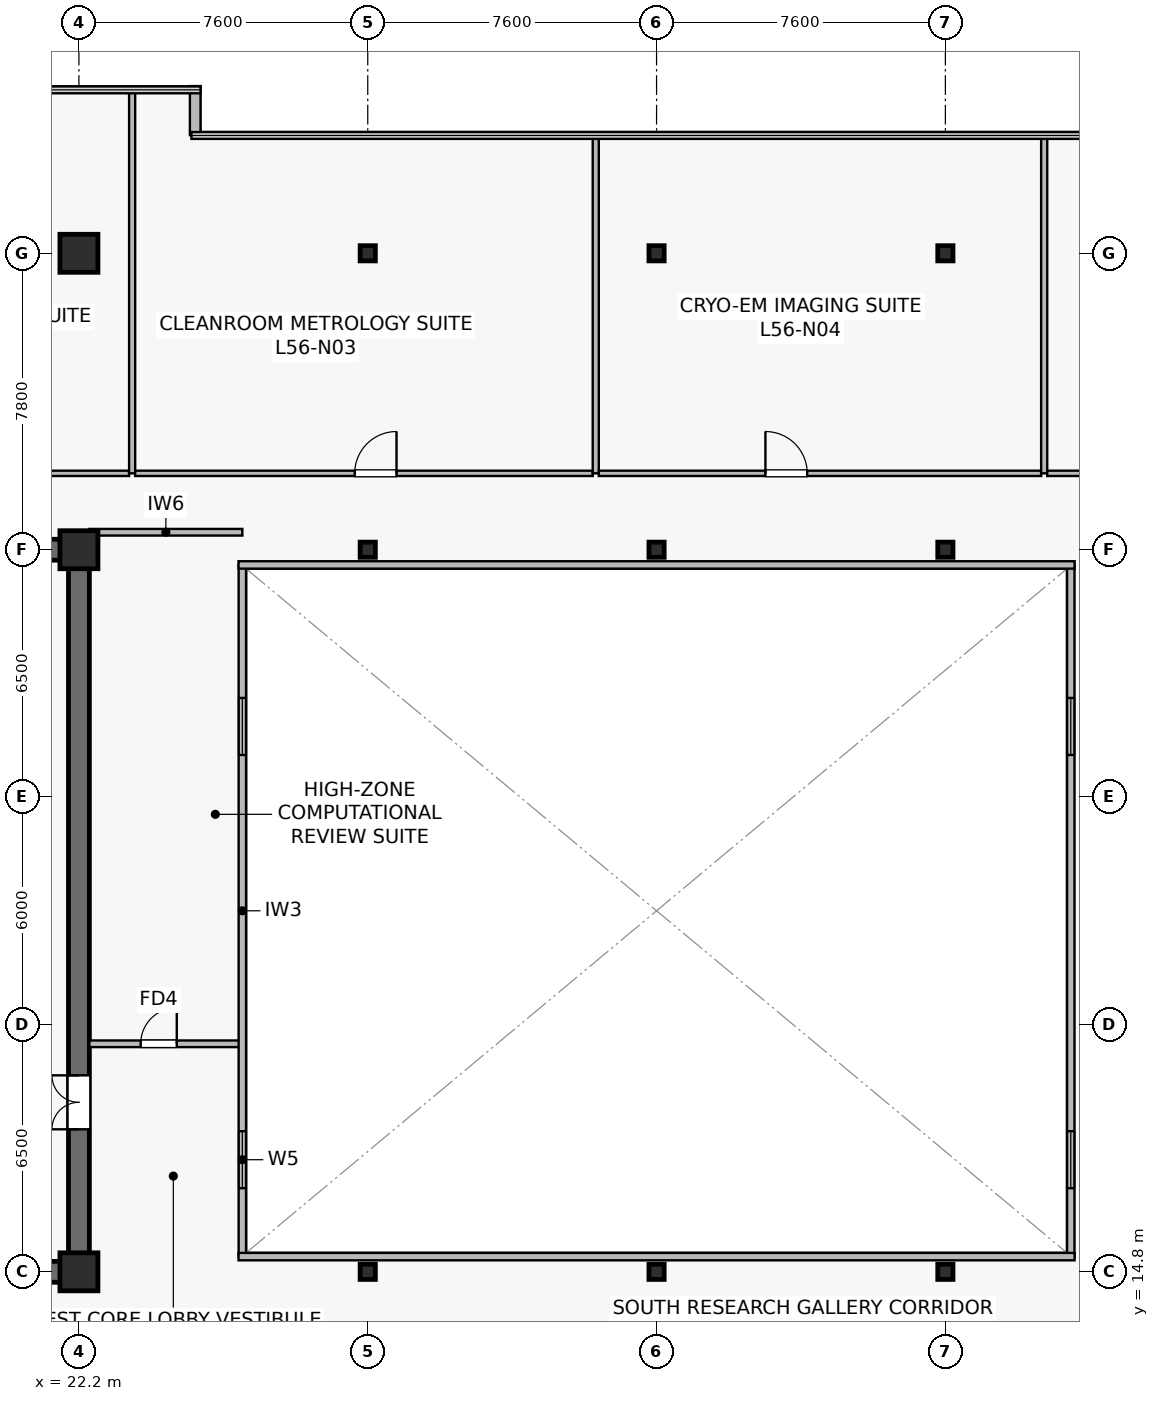
"""IFC4 building model, lengths in metres.
Left out: names, types, materials, properties, quantities, classifications, styles, units other than length and angle.
Written with IfcOpenShell. Run it as: python <this file> out.ifc"""

import sys

from ifc_helpers import new_model, si_unit, direction, frame, frame_2d, origin, origin_2d, place, context, subcontext, project, spatial, rectangle, hollow_rectangle, extrude, source, transform, mapped, element, fill, save


model = new_model("IFC4")
c1 = context("Model", 3, precision=1e-05, world=origin(), true_north=direction((0.0, 1.0)))
c2 = subcontext(c1, "Body", "Model", "MODEL_VIEW")
j1 = project(units=[si_unit("LENGTHUNIT", "METRE"), si_unit("PLANEANGLEUNIT", "RADIAN")], contexts=[c1])
p1 = place(None, origin())
s1 = spatial("IfcSite", under=j1, at=p1, CompositionType="ELEMENT")
p2 = place(p1, origin())
s2 = spatial("IfcBuilding", under=s1, at=p2, CompositionType="ELEMENT")
p3 = place(p2, frame((0.0, 0.0, 234.2)))
s3 = spatial("IfcBuildingStorey", under=s2, at=p3, CompositionType="ELEMENT", Elevation=234.2)
p4 = place(p3, frame((7.125, 14.8, 0.0), z_axis=(0.0, 0.0, 1.0), x_axis=(1.0, 0.0, 0.0)))
e1 = element("IfcWall", 1, at=p4, inside=s3, PredefinedType="SHEAR", context=c2, shape_type="SweptSolid", body=[
    extrude(rectangle(XDim=15.35, YDim=0.55, at=frame_2d((7.675, 0.0))), origin(), (0.0, 0.0, 1.0), 3.8),
])
p5 = place(p3, frame((7.125, 33.8, 0.0), z_axis=(0.0, 0.0, 1.0), x_axis=(1.0, 0.0, 0.0)))
e2 = element("IfcWall", 2, at=p5, inside=s3, PredefinedType="SHEAR", context=c2, shape_type="SweptSolid", body=[
    extrude(rectangle(XDim=15.35, YDim=0.55, at=frame_2d((7.675, 0.0))), origin(), (0.0, 0.0, 1.0), 3.8),
])
p6 = place(p5, frame((6.775, 0.0, 0.0)))
e3 = element("IfcOpeningElement", 3, at=p6, cuts=e2, PredefinedType="OPENING", context=c2, shape_type="SweptSolid", body=[
    extrude(rectangle(XDim=0.95, YDim=2.15, at=frame_2d((0.475, 1.075))), frame((0.0, 0.285, 0.0), z_axis=(0.0, -1.0, 0.0), x_axis=(1.0, 0.0, 0.0)), (0.0, 0.0, 1.0), 0.57),
])
p7 = place(p5, frame((11.84, 0.0, 0.0)))
e4 = element("IfcOpeningElement", 4, at=p7, cuts=e2, PredefinedType="OPENING", context=c2, shape_type="SweptSolid", body=[
    extrude(rectangle(XDim=0.95, YDim=2.15, at=frame_2d((0.475, 1.075))), frame((0.0, 0.285, 0.0), z_axis=(0.0, -1.0, 0.0), x_axis=(1.0, 0.0, 0.0)), (0.0, 0.0, 1.0), 0.57),
])
p8 = place(p3, frame((22.2, 15.075, 0.0), z_axis=(0.0, 0.0, 1.0), x_axis=(0.0, 1.0, 0.0)))
e5 = element("IfcWall", 5, at=p8, inside=s3, PredefinedType="SHEAR", context=c2, shape_type="SweptSolid", body=[
    extrude(rectangle(XDim=18.45, YDim=0.55, at=frame_2d((9.225, 0.0))), origin(), (0.0, 0.0, 1.0), 3.8),
])
p9 = place(p8, frame((3.475, 0.0, 0.0)))
e6 = element("IfcOpeningElement", 6, at=p9, cuts=e5, PredefinedType="OPENING", context=c2, shape_type="SweptSolid", body=[
    extrude(rectangle(XDim=1.42, YDim=2.2, at=frame_2d((0.71, 1.1))), frame((0.0, 0.285, 0.0), z_axis=(0.0, -1.0, 0.0), x_axis=(1.0, 0.0, 0.0)), (0.0, 0.0, 1.0), 0.57),
])
m1 = source(origin(), c2, "Body", "SweptSolid", [
    extrude(rectangle(XDim=1.0, YDim=1.0, at=origin_2d()), origin(), (0.0, 0.0, 1.0), 4.1),
])
for number, where, z_axis, x_axis in (
    (7, (22.2, 14.8, 0.0), (0.0, 0.0, 1.0), (1.0, 0.0, 0.0)),
    (8, (22.2, 33.8, 0.0), (0.0, 0.0, 1.0), (1.0, 0.0, 0.0)),
    (9, (22.2, 41.6, 0.0), (0.0, 0.0, 1.0), (1.0, 0.0, 0.0)),
):
    element("IfcColumn", number, at=place(p3, frame(where, z_axis=z_axis, x_axis=x_axis)), inside=s3, PredefinedType="COLUMN", context=c2, shape_type="MappedRepresentation", body=[
        mapped(m1, transform((0.0, 0.0, 0.0), scale=1.0)),
    ])
m2 = source(origin(), c2, "Body", "SweptSolid", [
    extrude(hollow_rectangle(XDim=0.4, YDim=0.4, WallThickness=0.019, at=origin_2d()), origin(), (0.0, 0.0, 1.0), 4.1),
])
for number, where, z_axis, x_axis in (
    (10, (29.8, 14.8, 0.0), (0.0, 0.0, 1.0), (1.0, 0.0, 0.0)),
    (11, (29.8, 33.8, 0.0), (0.0, 0.0, 1.0), (1.0, 0.0, 0.0)),
    (12, (29.8, 41.6, 0.0), (0.0, 0.0, 1.0), (1.0, 0.0, 0.0)),
    (13, (37.4, 14.8, 0.0), (0.0, 0.0, 1.0), (1.0, 0.0, 0.0)),
    (14, (37.4, 33.8, 0.0), (0.0, 0.0, 1.0), (1.0, 0.0, 0.0)),
    (15, (37.4, 41.6, 0.0), (0.0, 0.0, 1.0), (1.0, 0.0, 0.0)),
    (16, (45.0, 14.8, 0.0), (0.0, 0.0, 1.0), (1.0, 0.0, 0.0)),
    (17, (45.0, 33.8, 0.0), (0.0, 0.0, 1.0), (1.0, 0.0, 0.0)),
    (18, (45.0, 41.6, 0.0), (0.0, 0.0, 1.0), (1.0, 0.0, 0.0)),
):
    element("IfcColumn", number, at=place(p3, frame(where, z_axis=z_axis, x_axis=x_axis)), inside=s3, PredefinedType="COLUMN", context=c2, shape_type="MappedRepresentation", body=[
        mapped(m2, transform((0.0, 0.0, 0.0), scale=1.0)),
    ])
p10 = place(p3, frame((25.26, 44.707, 0.0), z_axis=(0.0, 0.0, 1.0), x_axis=(0.0, 1.0, 0.0)))
e19 = element("IfcWall", 19, at=p10, inside=s3, PredefinedType="STANDARD", context=c2, shape_type="SweptSolid", body=[
    extrude(rectangle(XDim=1.293, YDim=0.28, at=frame_2d((0.646, 0.0))), origin(), (0.0, 0.0, 1.0), 3.8),
])
p11 = place(p3, frame((22.475, 34.26, 0.0), z_axis=(0.0, 0.0, 1.0), x_axis=(1.0, 0.0, 0.0)))
e20 = element("IfcWall", 20, at=p11, inside=s3, PredefinedType="PARTITIONING", context=c2, shape_type="SweptSolid", body=[
    extrude(rectangle(XDim=4.025, YDim=0.175, at=frame_2d((2.012, 0.0))), origin(), (0.0, 0.0, 1.0), 3.485),
])
p12 = place(p3, frame((22.475, 20.8, 0.0), z_axis=(0.0, 0.0, 1.0), x_axis=(1.0, 0.0, 0.0)))
e21 = element("IfcWall", 21, at=p12, inside=s3, PredefinedType="PARTITIONING", context=c2, shape_type="SweptSolid", body=[
    extrude(rectangle(XDim=4.025, YDim=0.175, at=frame_2d((2.012, 0.0))), origin(), (0.0, 0.0, 1.0), 3.8),
])
p13 = place(p12, frame((1.35, 0.0, 0.0)))
e22 = element("IfcOpeningElement", 22, at=p13, cuts=e21, PredefinedType="OPENING", context=c2, shape_type="SweptSolid", body=[
    extrude(rectangle(XDim=0.95, YDim=2.15, at=frame_2d((0.475, 1.075))), frame((0.0, 0.098, 0.0), z_axis=(0.0, -1.0, 0.0), x_axis=(1.0, 0.0, 0.0)), (0.0, 0.0, 1.0), 0.195),
])
p14 = place(p3, frame((26.5, 15.2, 0.0), z_axis=(0.0, 0.0, 1.0), x_axis=(0.0, 1.0, 0.0)))
e23 = element("IfcWall", 23, at=p14, inside=s3, PredefinedType="SOLIDWALL", context=c2, shape_type="SweptSolid", body=[
    extrude(rectangle(XDim=18.2, YDim=0.195, at=frame_2d((9.1, 0.0))), origin(), (0.0, 0.0, 1.0), 3.8),
])
p15 = place(p14, frame((1.8, 0.0, 0.9)))
e24 = element("IfcOpeningElement", 24, at=p15, cuts=e23, PredefinedType="OPENING", context=c2, shape_type="SweptSolid", body=[
    extrude(rectangle(XDim=1.5, YDim=1.4, at=frame_2d((0.75, 0.7))), frame((0.0, 0.107, 0.0), z_axis=(0.0, -1.0, 0.0), x_axis=(1.0, 0.0, 0.0)), (0.0, 0.0, 1.0), 0.215),
])
p16 = place(p14, frame((13.2, 0.0, 0.9)))
e25 = element("IfcOpeningElement", 25, at=p16, cuts=e23, PredefinedType="OPENING", context=c2, shape_type="SweptSolid", body=[
    extrude(rectangle(XDim=1.5, YDim=1.4, at=frame_2d((0.75, 0.7))), frame((0.0, 0.107, 0.0), z_axis=(0.0, -1.0, 0.0), x_axis=(1.0, 0.0, 0.0)), (0.0, 0.0, 1.0), 0.215),
])
p17 = place(p3, frame((48.3, 15.2, 0.0), z_axis=(0.0, 0.0, 1.0), x_axis=(0.0, 1.0, 0.0)))
e26 = element("IfcWall", 26, at=p17, inside=s3, PredefinedType="SOLIDWALL", context=c2, shape_type="SweptSolid", body=[
    extrude(rectangle(XDim=18.2, YDim=0.195, at=frame_2d((9.1, 0.0))), origin(), (0.0, 0.0, 1.0), 3.8),
])
p18 = place(p17, frame((1.8, 0.0, 0.9)))
e27 = element("IfcOpeningElement", 27, at=p18, cuts=e26, PredefinedType="OPENING", context=c2, shape_type="SweptSolid", body=[
    extrude(rectangle(XDim=1.5, YDim=1.4, at=frame_2d((0.75, 0.7))), frame((0.0, 0.107, 0.0), z_axis=(0.0, -1.0, 0.0), x_axis=(1.0, 0.0, 0.0)), (0.0, 0.0, 1.0), 0.215),
])
p19 = place(p17, frame((13.2, 0.0, 0.9)))
e28 = element("IfcOpeningElement", 28, at=p19, cuts=e26, PredefinedType="OPENING", context=c2, shape_type="SweptSolid", body=[
    extrude(rectangle(XDim=1.5, YDim=1.4, at=frame_2d((0.75, 0.7))), frame((0.0, 0.107, 0.0), z_axis=(0.0, -1.0, 0.0), x_axis=(1.0, 0.0, 0.0)), (0.0, 0.0, 1.0), 0.215),
])
for number, where, z_axis, x_axis in (
    (29, (26.4, 15.2, 0.0), (0.0, 0.0, 1.0), (1.0, 0.0, 0.0)),
    (30, (26.4, 33.4, 0.0), (0.0, 0.0, 1.0), (1.0, 0.0, 0.0)),
):
    element("IfcWall", number, at=place(p3, frame(where, z_axis=z_axis, x_axis=x_axis)), inside=s3, PredefinedType="SOLIDWALL", context=c2, shape_type="SweptSolid", body=[
        extrude(rectangle(XDim=22.0, YDim=0.195, at=frame_2d((11.0, 0.0))), origin(), (0.0, 0.0, 1.0), 3.8),
    ])
p20 = place(p3, frame((12.88, 35.81, 0.0), z_axis=(0.0, 0.0, 1.0), x_axis=(1.0, 0.0, 0.0)))
e31 = element("IfcWall", 31, at=p20, inside=s3, PredefinedType="PARTITIONING", context=c2, shape_type="SweptSolid", body=[
    extrude(rectangle(XDim=10.64, YDim=0.14, at=frame_2d((5.32, 0.0))), origin(), (0.0, 0.0, 1.0), 3.197),
])
p21 = place(p20, frame((3.974, 0.0, 0.0)))
e32 = element("IfcOpeningElement", 32, at=p21, cuts=e31, PredefinedType="OPENING", context=c2, shape_type="SweptSolid", body=[
    extrude(rectangle(XDim=1.1, YDim=2.18, at=frame_2d((0.55, 1.09))), frame((0.0, 0.08, 0.0), z_axis=(0.0, -1.0, 0.0), x_axis=(1.0, 0.0, 0.0)), (0.0, 0.0, 1.0), 0.16),
])
p22 = place(p3, frame((23.6, 35.81, 0.0), z_axis=(0.0, 0.0, 1.0), x_axis=(0.0, 1.0, 0.0)))
e33 = element("IfcWall", 33, at=p22, inside=s3, PredefinedType="PARTITIONING", context=c2, shape_type="SweptSolid", body=[
    extrude(rectangle(XDim=10.08, YDim=0.16, at=frame_2d((5.04, 0.0))), origin(), (0.0, 0.0, 1.0), 3.135),
])
p23 = place(p3, frame((23.68, 35.81, 0.0), z_axis=(0.0, 0.0, 1.0), x_axis=(1.0, 0.0, 0.0)))
e34 = element("IfcWall", 34, at=p23, inside=s3, PredefinedType="PARTITIONING", context=c2, shape_type="SweptSolid", body=[
    extrude(rectangle(XDim=12.04, YDim=0.14, at=frame_2d((6.02, 0.0))), origin(), (0.0, 0.0, 1.0), 3.197),
])
p24 = place(p23, frame((5.777, 0.0, 0.0)))
e35 = element("IfcOpeningElement", 35, at=p24, cuts=e34, PredefinedType="OPENING", context=c2, shape_type="SweptSolid", body=[
    extrude(rectangle(XDim=1.1, YDim=2.18, at=frame_2d((0.55, 1.09))), frame((0.0, 0.08, 0.0), z_axis=(0.0, -1.0, 0.0), x_axis=(1.0, 0.0, 0.0)), (0.0, 0.0, 1.0), 0.16),
])
p25 = place(p3, frame((35.8, 35.81, 0.0), z_axis=(0.0, 0.0, 1.0), x_axis=(0.0, 1.0, 0.0)))
e36 = element("IfcWall", 36, at=p25, inside=s3, PredefinedType="PARTITIONING", context=c2, shape_type="SweptSolid", body=[
    extrude(rectangle(XDim=8.88, YDim=0.16, at=frame_2d((4.44, 0.0))), origin(), (0.0, 0.0, 1.0), 3.135),
])
p26 = place(p3, frame((35.88, 35.81, 0.0), z_axis=(0.0, 0.0, 1.0), x_axis=(1.0, 0.0, 0.0)))
e37 = element("IfcWall", 37, at=p26, inside=s3, PredefinedType="PARTITIONING", context=c2, shape_type="SweptSolid", body=[
    extrude(rectangle(XDim=11.64, YDim=0.14, at=frame_2d((5.82, 0.0))), origin(), (0.0, 0.0, 1.0), 3.197),
])
p27 = place(p26, frame((4.385, 0.0, 0.0)))
e38 = element("IfcOpeningElement", 38, at=p27, cuts=e37, PredefinedType="OPENING", context=c2, shape_type="SweptSolid", body=[
    extrude(rectangle(XDim=1.1, YDim=2.18, at=frame_2d((0.55, 1.09))), frame((0.0, 0.08, 0.0), z_axis=(0.0, -1.0, 0.0), x_axis=(1.0, 0.0, 0.0)), (0.0, 0.0, 1.0), 0.16),
])
p28 = place(p3, frame((47.6, 35.81, 0.0), z_axis=(0.0, 0.0, 1.0), x_axis=(0.0, 1.0, 0.0)))
e39 = element("IfcWall", 39, at=p28, inside=s3, PredefinedType="PARTITIONING", context=c2, shape_type="SweptSolid", body=[
    extrude(rectangle(XDim=8.88, YDim=0.16, at=frame_2d((4.44, 0.0))), origin(), (0.0, 0.0, 1.0), 3.135),
])
p29 = place(p3, frame((47.68, 35.81, 0.0), z_axis=(0.0, 0.0, 1.0), x_axis=(1.0, 0.0, 0.0)))
e40 = element("IfcWall", 40, at=p29, inside=s3, PredefinedType="PARTITIONING", context=c2, shape_type="SweptSolid", body=[
    extrude(rectangle(XDim=11.44, YDim=0.14, at=frame_2d((5.72, 0.0))), origin(), (0.0, 0.0, 1.0), 3.197),
])
p30 = place(p29, frame((5.459, 0.0, 0.0)))
e41 = element("IfcOpeningElement", 41, at=p30, cuts=e40, PredefinedType="OPENING", context=c2, shape_type="SweptSolid", body=[
    extrude(rectangle(XDim=1.1, YDim=2.18, at=frame_2d((0.55, 1.09))), frame((0.0, 0.08, 0.0), z_axis=(0.0, -1.0, 0.0), x_axis=(1.0, 0.0, 0.0)), (0.0, 0.0, 1.0), 0.16),
])
m3 = source(origin(), c2, "Body", "SweptSolid", [
    extrude(rectangle(XDim=1.5, YDim=1.4, at=frame_2d((0.75, 0.7))), frame((0.0, 0.03, 0.0), z_axis=(0.0, -1.0, 0.0), x_axis=(1.0, 0.0, 0.0)), (0.0, 0.0, 1.0), 0.06),
])
p31 = place(p15, origin())
e42 = element("IfcWindow", 42, at=p31, inside=s3, PartitioningType="SINGLE_PANEL", PredefinedType="WINDOW", context=c2, shape_type="MappedRepresentation", body=[
    mapped(m3, transform((0.0, 0.0, 0.0), scale=1.0)),
])
fill(e24, e42)
p32 = place(p16, origin())
e43 = element("IfcWindow", 43, at=p32, inside=s3, PartitioningType="SINGLE_PANEL", PredefinedType="WINDOW", context=c2, shape_type="MappedRepresentation", body=[
    mapped(m3, transform((0.0, 0.0, 0.0), scale=1.0)),
])
fill(e25, e43)
p33 = place(p18, origin())
e44 = element("IfcWindow", 44, at=p33, inside=s3, PartitioningType="SINGLE_PANEL", PredefinedType="WINDOW", context=c2, shape_type="MappedRepresentation", body=[
    mapped(m3, transform((0.0, 0.0, 0.0), scale=1.0)),
])
fill(e27, e44)
p34 = place(p19, origin())
e45 = element("IfcWindow", 45, at=p34, inside=s3, PartitioningType="SINGLE_PANEL", PredefinedType="WINDOW", context=c2, shape_type="MappedRepresentation", body=[
    mapped(m3, transform((0.0, 0.0, 0.0), scale=1.0)),
])
fill(e28, e45)
m4 = source(origin(), c2, "Body", "SweptSolid", [
    extrude(rectangle(XDim=1.42, YDim=2.2, at=frame_2d((0.71, 1.1))), frame((0.0, 0.025, 0.0), z_axis=(0.0, -1.0, 0.0), x_axis=(1.0, 0.0, 0.0)), (0.0, 0.0, 1.0), 0.05),
])
p35 = place(p9, origin())
e46 = element("IfcDoor", 46, at=p35, inside=s3, OperationType="DOUBLE_DOOR_SINGLE_SWING", PredefinedType="DOOR", context=c2, shape_type="MappedRepresentation", body=[
    mapped(m4, transform((0.0, 0.0, 0.0), scale=1.0)),
])
fill(e6, e46)
m5 = source(origin(), c2, "Body", "SweptSolid", [
    extrude(rectangle(XDim=0.95, YDim=2.15, at=frame_2d((0.475, 1.075))), frame((0.0, 0.025, 0.0), z_axis=(0.0, -1.0, 0.0), x_axis=(1.0, 0.0, 0.0)), (0.0, 0.0, 1.0), 0.05),
])
p36 = place(p13, origin())
e47 = element("IfcDoor", 47, at=p36, inside=s3, OperationType="SINGLE_SWING_RIGHT", PredefinedType="DOOR", context=c2, shape_type="MappedRepresentation", body=[
    mapped(m5, transform((0.0, 0.0, 0.0), scale=1.0)),
])
fill(e22, e47)
m6 = source(origin(), c2, "Body", "SweptSolid", [
    extrude(rectangle(XDim=1.1, YDim=2.18, at=frame_2d((0.55, 1.09))), frame((0.0, 0.025, 0.0), z_axis=(0.0, -1.0, 0.0), x_axis=(1.0, 0.0, 0.0)), (0.0, 0.0, 1.0), 0.05),
])
p37 = place(p24, origin())
e48 = element("IfcDoor", 48, at=p37, inside=s3, OperationType="SINGLE_SWING_RIGHT", PredefinedType="DOOR", context=c2, shape_type="MappedRepresentation", body=[
    mapped(m6, transform((0.0, 0.0, 0.0), scale=1.0)),
])
fill(e35, e48)
p38 = place(p27, origin())
e49 = element("IfcDoor", 49, at=p38, inside=s3, OperationType="SINGLE_SWING_LEFT", PredefinedType="DOOR", context=c2, shape_type="MappedRepresentation", body=[
    mapped(m6, transform((0.0, 0.0, 0.0), scale=1.0)),
])
fill(e38, e49)
save(model, sys.argv[1])
